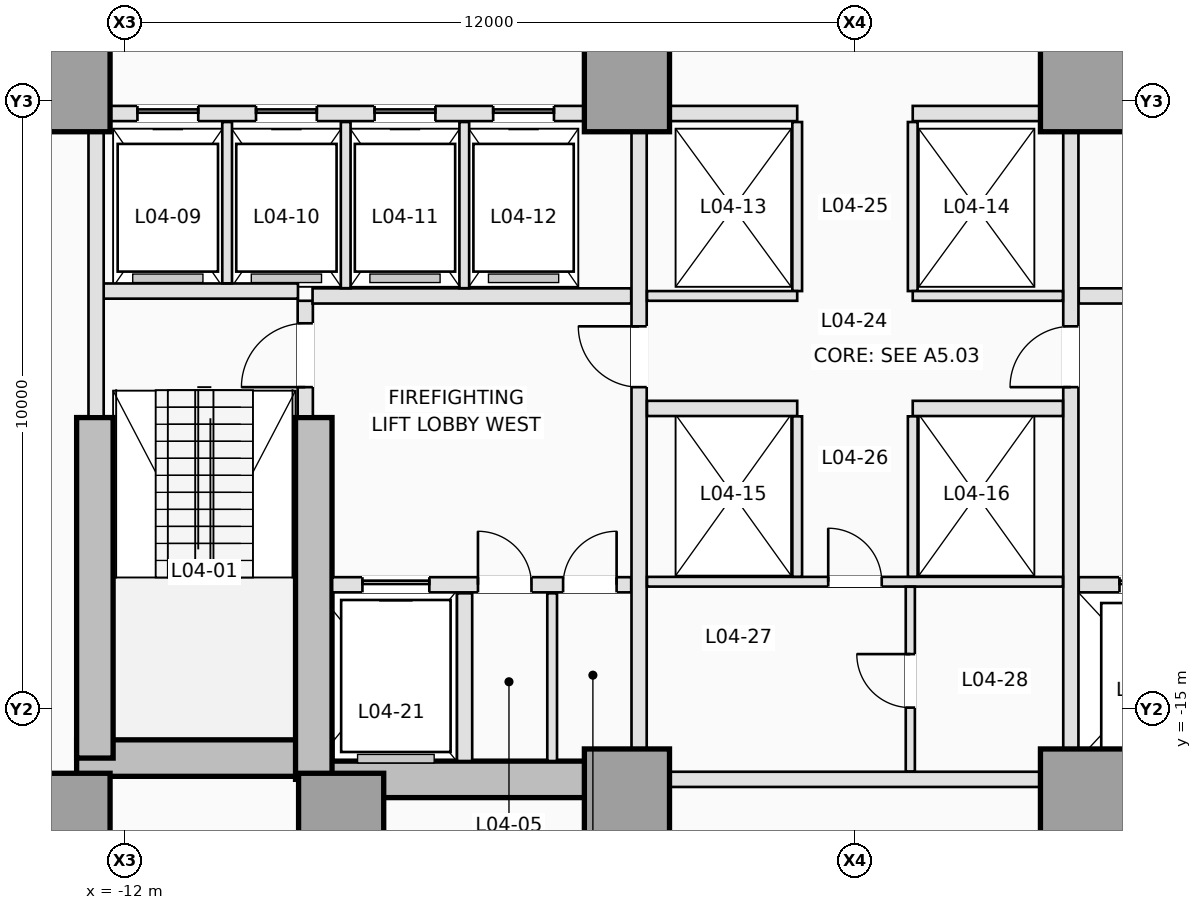
"""IFC4 building model, lengths in metres.
Left out: names, types, materials, properties, quantities, classifications, styles, units other than length and angle.
Written with IfcOpenShell. Run it as: python <this file> out.ifc"""

import sys

from ifc_helpers import new_model, si_unit, direction, frame, frame_2d, origin, origin_2d, place, context, subcontext, project, spatial, rectangle, extrude, element, fill, save


model = new_model("IFC4")
c1 = context("Model", 3, precision=1e-05, world=origin(), true_north=direction((0.0, 1.0)))
c2 = subcontext(c1, "Body", "Model", "MODEL_VIEW")
j1 = project(units=[si_unit("LENGTHUNIT", "METRE"), si_unit("PLANEANGLEUNIT", "RADIAN")], contexts=[c1])
p1 = place(None, origin())
s1 = spatial("IfcSite", under=j1, at=p1, CompositionType="ELEMENT")
p2 = place(p1, origin())
s2 = spatial("IfcBuilding", under=s1, at=p2, CompositionType="ELEMENT")
p3 = place(p2, frame((0.0, 0.0, 18.5)))
s3 = spatial("IfcBuildingStorey", under=s2, at=p3, CompositionType="ELEMENT", Elevation=18.5)
p4 = place(p3, frame((-12.8, -15.8, 0.0), z_axis=(0.0, 0.0, 1.0), x_axis=(1.0, 0.0, 0.0)))
e1 = element("IfcWall", 1, at=p4, inside=s3, PredefinedType="SHEAR", context=c2, shape_type="SweptSolid", body=[
    extrude(rectangle(XDim=4.2, YDim=0.6, at=frame_2d((2.1, 0.0))), origin(), (0.0, 0.0, 1.0), 4.5),
])
for number, where, z_axis, x_axis in (
    (2, (-8.9, -16.15, 0.0), (0.0, 0.0, 1.0), (1.0, 0.0, 0.0)),
    (3, (3.75, -16.15, 0.0), (0.0, 0.0, 1.0), (1.0, 0.0, 0.0)),
):
    element("IfcWall", number, at=place(p3, frame(where, z_axis=z_axis, x_axis=x_axis)), inside=s3, PredefinedType="SHEAR", context=c2, shape_type="SweptSolid", body=[
        extrude(rectangle(XDim=5.15, YDim=0.6, at=frame_2d((2.575, 0.0))), origin(), (0.0, 0.0, 1.0), 4.5),
    ])
p5 = place(p3, frame((-12.5, -15.8, 0.0), z_axis=(0.0, 0.0, 1.0), x_axis=(0.0, 1.0, 0.0)))
e4 = element("IfcWall", 4, at=p5, inside=s3, PredefinedType="SHEAR", context=c2, shape_type="SweptSolid", body=[
    extrude(rectangle(XDim=5.6, YDim=0.6, at=frame_2d((2.8, 0.0))), origin(), (0.0, 0.0, 1.0), 4.5),
])
p6 = place(p3, frame((-8.9, -16.15, 0.0), z_axis=(0.0, 0.0, 1.0), x_axis=(0.0, 1.0, 0.0)))
e5 = element("IfcWall", 5, at=p6, inside=s3, PredefinedType="SHEAR", context=c2, shape_type="SweptSolid", body=[
    extrude(rectangle(XDim=5.95, YDim=0.6, at=frame_2d((2.975, 0.0))), origin(), (0.0, 0.0, 1.0), 4.5),
])
for number, where, z_axis, x_axis in (
    (6, (-12.95, -16.75, 0.0), (0.0, 0.0, 1.0), (1.0, 0.0, 0.0)),
    (7, (-8.45, -16.75, 0.0), (0.0, 0.0, 1.0), (1.0, 0.0, 0.0)),
    (8, (-3.75, -16.35, 0.0), (0.0, 0.0, 1.0), (1.0, 0.0, 0.0)),
    (9, (3.75, -16.35, 0.0), (0.0, 0.0, 1.0), (1.0, 0.0, 0.0)),
    (10, (-12.95, -4.8, 0.0), (0.0, 0.0, 1.0), (1.0, 0.0, 0.0)),
    (11, (-3.75, -4.8, 0.0), (0.0, 0.0, 1.0), (1.0, 0.0, 0.0)),
    (12, (3.75, -4.8, 0.0), (0.0, 0.0, 1.0), (1.0, 0.0, 0.0)),
):
    element("IfcColumn", number, at=place(p3, frame(where, z_axis=z_axis, x_axis=x_axis)), inside=s3, PredefinedType="COLUMN", context=c2, shape_type="SweptSolid", body=[
        extrude(rectangle(XDim=1.4, YDim=1.4, at=origin_2d()), origin(), (0.0, 0.0, 1.0), 4.5),
    ])
p7 = place(p3, frame((-9.04, -10.18, 0.0), z_axis=(0.0, 0.0, 1.0), x_axis=(0.0, 1.0, 0.0)))
e13 = element("IfcWall", 13, at=p7, inside=s3, PredefinedType="PARTITIONING", context=c2, shape_type="SweptSolid", body=[
    extrude(rectangle(XDim=1.9, YDim=0.25, at=frame_2d((0.95, 0.0))), origin(), (0.0, 0.0, 1.0), 4.08),
])
p8 = place(p7, frame((0.48, 0.0, 0.0)))
e14 = element("IfcOpeningElement", 14, at=p8, cuts=e13, PredefinedType="OPENING", context=c2, shape_type="SweptSolid", body=[
    extrude(rectangle(XDim=1.05, YDim=2.15, at=frame_2d((0.525, 1.075))), frame((0.0, 0.135, 0.0), z_axis=(0.0, -1.0, 0.0), x_axis=(1.0, 0.0, 0.0)), (0.0, 0.0, 1.0), 0.27),
])
p9 = place(p3, frame((-12.38, -8.12, 0.0), z_axis=(0.0, 0.0, 1.0), x_axis=(1.0, 0.0, 0.0)))
e15 = element("IfcWall", 15, at=p9, inside=s3, PredefinedType="PARTITIONING", context=c2, shape_type="SweptSolid", body=[
    extrude(rectangle(XDim=3.22, YDim=0.25, at=frame_2d((1.61, 0.0))), origin(), (0.0, 0.0, 1.0), 4.08),
])
p10 = place(p3, frame((-12.48, -10.18, 0.0), z_axis=(0.0, 0.0, 1.0), x_axis=(0.0, 1.0, 0.0)))
e16 = element("IfcWall", 16, at=p10, inside=s3, PredefinedType="PARTITIONING", context=c2, shape_type="SweptSolid", body=[
    extrude(rectangle(XDim=4.678, YDim=0.25, at=frame_2d((2.339, 0.0))), origin(), (0.0, 0.0, 1.0), 4.08),
])
p11 = place(p3, frame((-8.598, -12.95, 0.0), z_axis=(0.0, 0.0, 1.0), x_axis=(1.0, 0.0, 0.0)))
e17 = element("IfcWall", 17, at=p11, inside=s3, PredefinedType="PARTITIONING", context=c2, shape_type="SweptSolid", body=[
    extrude(rectangle(XDim=4.918, YDim=0.25, at=frame_2d((2.459, 0.0))), origin(), (0.0, 0.0, 1.0), 4.08),
])
p12 = place(p11, frame((0.498, 0.0, 0.0)))
e18 = element("IfcOpeningElement", 18, at=p12, cuts=e17, PredefinedType="OPENING", context=c2, shape_type="SweptSolid", body=[
    extrude(rectangle(XDim=1.1, YDim=2.15, at=frame_2d((0.55, 1.075))), frame((0.0, 0.135, 0.0), z_axis=(0.0, -1.0, 0.0), x_axis=(1.0, 0.0, 0.0)), (0.0, 0.0, 1.0), 0.27),
])
p13 = place(p11, frame((2.398, 0.0, 0.0)))
e19 = element("IfcOpeningElement", 19, at=p13, cuts=e17, PredefinedType="OPENING", context=c2, shape_type="SweptSolid", body=[
    extrude(rectangle(XDim=0.88, YDim=2.1, at=frame_2d((0.44, 1.05))), frame((0.0, 0.135, 0.0), z_axis=(0.0, -1.0, 0.0), x_axis=(1.0, 0.0, 0.0)), (0.0, 0.0, 1.0), 0.27),
])
p14 = place(p11, frame((3.798, 0.0, 0.0)))
e20 = element("IfcOpeningElement", 20, at=p14, cuts=e17, PredefinedType="OPENING", context=c2, shape_type="SweptSolid", body=[
    extrude(rectangle(XDim=0.88, YDim=2.1, at=frame_2d((0.44, 1.05))), frame((0.0, 0.135, 0.0), z_axis=(0.0, -1.0, 0.0), x_axis=(1.0, 0.0, 0.0)), (0.0, 0.0, 1.0), 0.27),
])
p15 = place(p3, frame((3.68, -12.95, 0.0), z_axis=(0.0, 0.0, 1.0), x_axis=(1.0, 0.0, 0.0)))
e21 = element("IfcWall", 21, at=p15, inside=s3, PredefinedType="PARTITIONING", context=c2, shape_type="SweptSolid", body=[
    extrude(rectangle(XDim=4.918, YDim=0.25, at=frame_2d((2.459, 0.0))), origin(), (0.0, 0.0, 1.0), 4.08),
])
p16 = place(p15, frame((3.32, 0.0, 0.0)))
e22 = element("IfcOpeningElement", 22, at=p16, cuts=e21, PredefinedType="OPENING", context=c2, shape_type="SweptSolid", body=[
    extrude(rectangle(XDim=1.1, YDim=2.15, at=frame_2d((0.55, 1.075))), frame((0.0, 0.135, 0.0), z_axis=(0.0, -1.0, 0.0), x_axis=(1.0, 0.0, 0.0)), (0.0, 0.0, 1.0), 0.27),
])
p17 = place(p15, frame((0.67, 0.0, 0.0)))
e23 = element("IfcOpeningElement", 23, at=p17, cuts=e21, PredefinedType="OPENING", context=c2, shape_type="SweptSolid", body=[
    extrude(rectangle(XDim=1.2, YDim=2.15, at=frame_2d((0.6, 1.075))), frame((0.0, 0.135, 0.0), z_axis=(0.0, -1.0, 0.0), x_axis=(1.0, 0.0, 0.0)), (0.0, 0.0, 1.0), 0.27),
])
p18 = place(p3, frame((-6.42, -15.848, 0.0), z_axis=(0.0, 0.0, 1.0), x_axis=(0.0, 1.0, 0.0)))
e24 = element("IfcWall", 24, at=p18, inside=s3, PredefinedType="PARTITIONING", context=c2, shape_type="SweptSolid", body=[
    extrude(rectangle(XDim=2.758, YDim=0.25, at=frame_2d((1.379, 0.0))), origin(), (0.0, 0.0, 1.0), 4.08),
])
p19 = place(p3, frame((-4.98, -15.848, 0.0), z_axis=(0.0, 0.0, 1.0), x_axis=(0.0, 1.0, 0.0)))
e25 = element("IfcWall", 25, at=p19, inside=s3, PredefinedType="PARTITIONING", context=c2, shape_type="SweptSolid", body=[
    extrude(rectangle(XDim=2.758, YDim=0.16, at=frame_2d((1.379, 0.0))), origin(), (0.0, 0.0, 1.0), 4.08),
])
for number, where, z_axis, x_axis in (
    (26, (-8.92, -8.2, 0.0), (0.0, 0.0, 1.0), (1.0, 0.0, 0.0)),
    (27, (3.68, -8.2, 0.0), (0.0, 0.0, 1.0), (1.0, 0.0, 0.0)),
):
    element("IfcWall", number, at=place(p3, frame(where, z_axis=z_axis, x_axis=x_axis)), inside=s3, PredefinedType="PARTITIONING", context=c2, shape_type="SweptSolid", body=[
        extrude(rectangle(XDim=5.24, YDim=0.25, at=frame_2d((2.62, 0.0))), origin(), (0.0, 0.0, 1.0), 4.08),
    ])
p20 = place(p3, frame((-3.55, -15.648, 0.0), z_axis=(0.0, 0.0, 1.0), x_axis=(0.0, 1.0, 0.0)))
e28 = element("IfcWall", 28, at=p20, inside=s3, PredefinedType="PARTITIONING", context=c2, shape_type="SweptSolid", body=[
    extrude(rectangle(XDim=10.146, YDim=0.25, at=frame_2d((5.073, 0.0))), origin(), (0.0, 0.0, 1.0), 4.08),
])
p21 = place(p20, frame((5.948, 0.0, 0.0)))
e29 = element("IfcOpeningElement", 29, at=p21, cuts=e28, PredefinedType="OPENING", context=c2, shape_type="SweptSolid", body=[
    extrude(rectangle(XDim=1.0, YDim=2.15, at=frame_2d((0.5, 1.075))), frame((0.0, 0.135, 0.0), z_axis=(0.0, -1.0, 0.0), x_axis=(1.0, 0.0, 0.0)), (0.0, 0.0, 1.0), 0.27),
])
p22 = place(p3, frame((3.55, -15.648, 0.0), z_axis=(0.0, 0.0, 1.0), x_axis=(0.0, 1.0, 0.0)))
e30 = element("IfcWall", 30, at=p22, inside=s3, PredefinedType="PARTITIONING", context=c2, shape_type="SweptSolid", body=[
    extrude(rectangle(XDim=10.146, YDim=0.25, at=frame_2d((5.073, 0.0))), origin(), (0.0, 0.0, 1.0), 4.08),
])
p23 = place(p22, frame((5.948, 0.0, 0.0)))
e31 = element("IfcOpeningElement", 31, at=p23, cuts=e30, PredefinedType="OPENING", context=c2, shape_type="SweptSolid", body=[
    extrude(rectangle(XDim=1.0, YDim=2.15, at=frame_2d((0.5, 1.075))), frame((0.0, 0.135, 0.0), z_axis=(0.0, -1.0, 0.0), x_axis=(1.0, 0.0, 0.0)), (0.0, 0.0, 1.0), 0.27),
])
p24 = place(p3, frame((-12.248, -5.2, 0.0), z_axis=(0.0, 0.0, 1.0), x_axis=(1.0, 0.0, 0.0)))
e32 = element("IfcWall", 32, at=p24, inside=s3, PredefinedType="PARTITIONING", context=c2, shape_type="SweptSolid", body=[
    extrude(rectangle(XDim=7.796, YDim=0.25, at=frame_2d((3.898, 0.0))), origin(), (0.0, 0.0, 1.0), 4.08),
])
p25 = place(p24, frame((0.448, 0.0, 0.0)))
e33 = element("IfcOpeningElement", 33, at=p25, cuts=e32, PredefinedType="OPENING", context=c2, shape_type="SweptSolid", body=[
    extrude(rectangle(XDim=1.0, YDim=2.15, at=frame_2d((0.5, 1.075))), frame((0.0, 0.135, 0.0), z_axis=(0.0, -1.0, 0.0), x_axis=(1.0, 0.0, 0.0)), (0.0, 0.0, 1.0), 0.27),
])
p26 = place(p24, frame((2.398, 0.0, 0.0)))
e34 = element("IfcOpeningElement", 34, at=p26, cuts=e32, PredefinedType="OPENING", context=c2, shape_type="SweptSolid", body=[
    extrude(rectangle(XDim=1.0, YDim=2.15, at=frame_2d((0.5, 1.075))), frame((0.0, 0.135, 0.0), z_axis=(0.0, -1.0, 0.0), x_axis=(1.0, 0.0, 0.0)), (0.0, 0.0, 1.0), 0.27),
])
p27 = place(p24, frame((4.348, 0.0, 0.0)))
e35 = element("IfcOpeningElement", 35, at=p27, cuts=e32, PredefinedType="OPENING", context=c2, shape_type="SweptSolid", body=[
    extrude(rectangle(XDim=1.0, YDim=2.15, at=frame_2d((0.5, 1.075))), frame((0.0, 0.135, 0.0), z_axis=(0.0, -1.0, 0.0), x_axis=(1.0, 0.0, 0.0)), (0.0, 0.0, 1.0), 0.27),
])
p28 = place(p24, frame((6.298, 0.0, 0.0)))
e36 = element("IfcOpeningElement", 36, at=p28, cuts=e32, PredefinedType="OPENING", context=c2, shape_type="SweptSolid", body=[
    extrude(rectangle(XDim=1.0, YDim=2.15, at=frame_2d((0.5, 1.075))), frame((0.0, 0.135, 0.0), z_axis=(0.0, -1.0, 0.0), x_axis=(1.0, 0.0, 0.0)), (0.0, 0.0, 1.0), 0.27),
])
for number, where, z_axis, x_axis in (
    (37, (-3.048, -5.2, 0.0), (0.0, 0.0, 1.0), (1.0, 0.0, 0.0)),
    (38, (0.95, -5.2, 0.0), (0.0, 0.0, 1.0), (1.0, 0.0, 0.0)),
):
    element("IfcWall", number, at=place(p3, frame(where, z_axis=z_axis, x_axis=x_axis)), inside=s3, PredefinedType="PARTITIONING", context=c2, shape_type="SweptSolid", body=[
        extrude(rectangle(XDim=2.098, YDim=0.25, at=frame_2d((1.049, 0.0))), origin(), (0.0, 0.0, 1.0), 4.08),
    ])
p29 = place(p3, frame((-10.325, -7.993, 0.0), z_axis=(0.0, 0.0, 1.0), x_axis=(0.0, 1.0, 0.0)))
e39 = element("IfcWall", 39, at=p29, inside=s3, PredefinedType="PARTITIONING", context=c2, shape_type="SweptSolid", body=[
    extrude(rectangle(XDim=2.653, YDim=0.16, at=frame_2d((1.326, 0.0))), origin(), (0.0, 0.0, 1.0), 4.08),
])
for number, where, z_axis, x_axis in (
    (40, (-8.375, -8.073, 0.0), (0.0, 0.0, 1.0), (0.0, 1.0, 0.0)),
    (41, (-6.425, -8.073, 0.0), (0.0, 0.0, 1.0), (0.0, 1.0, 0.0)),
):
    element("IfcWall", number, at=place(p3, frame(where, z_axis=z_axis, x_axis=x_axis)), inside=s3, PredefinedType="PARTITIONING", context=c2, shape_type="SweptSolid", body=[
        extrude(rectangle(XDim=2.733, YDim=0.16, at=frame_2d((1.366, 0.0))), origin(), (0.0, 0.0, 1.0), 4.08),
    ])
p30 = place(p3, frame((-3.048, -16.15, 0.0), z_axis=(0.0, 0.0, 1.0), x_axis=(1.0, 0.0, 0.0)))
e42 = element("IfcWall", 42, at=p30, inside=s3, PredefinedType="PARTITIONING", context=c2, shape_type="SweptSolid", body=[
    extrude(rectangle(XDim=6.096, YDim=0.25, at=frame_2d((3.048, 0.0))), origin(), (0.0, 0.0, 1.0), 3.056),
])
for number, where, z_axis, x_axis in (
    (43, (-0.95, -8.12, 0.0), (0.0, 0.0, 1.0), (0.0, 1.0, 0.0)),
    (44, (0.95, -8.12, 0.0), (0.0, 0.0, 1.0), (0.0, 1.0, 0.0)),
):
    element("IfcWall", number, at=place(p3, frame(where, z_axis=z_axis, x_axis=x_axis)), inside=s3, PredefinedType="PARTITIONING", context=c2, shape_type="SweptSolid", body=[
        extrude(rectangle(XDim=2.78, YDim=0.16, at=frame_2d((1.39, 0.0))), origin(), (0.0, 0.0, 1.0), 4.08),
    ])
for number, where, z_axis, x_axis in (
    (45, (-3.42, -8.2, 0.0), (0.0, 0.0, 1.0), (1.0, 0.0, 0.0)),
    (46, (0.95, -8.2, 0.0), (0.0, 0.0, 1.0), (1.0, 0.0, 0.0)),
):
    element("IfcWall", number, at=place(p3, frame(where, z_axis=z_axis, x_axis=x_axis)), inside=s3, PredefinedType="PARTITIONING", context=c2, shape_type="SweptSolid", body=[
        extrude(rectangle(XDim=2.47, YDim=0.16, at=frame_2d((1.235, 0.0))), origin(), (0.0, 0.0, 1.0), 4.08),
    ])
for number, where, z_axis, x_axis in (
    (47, (-3.42, -10.05, 0.0), (0.0, 0.0, 1.0), (1.0, 0.0, 0.0)),
    (48, (0.95, -10.05, 0.0), (0.0, 0.0, 1.0), (1.0, 0.0, 0.0)),
):
    element("IfcWall", number, at=place(p3, frame(where, z_axis=z_axis, x_axis=x_axis)), inside=s3, PredefinedType="PARTITIONING", context=c2, shape_type="SweptSolid", body=[
        extrude(rectangle(XDim=2.47, YDim=0.25, at=frame_2d((1.235, 0.0))), origin(), (0.0, 0.0, 1.0), 4.08),
    ])
p31 = place(p3, frame((-3.42, -12.9, 0.0), z_axis=(0.0, 0.0, 1.0), x_axis=(1.0, 0.0, 0.0)))
e49 = element("IfcWall", 49, at=p31, inside=s3, PredefinedType="PARTITIONING", context=c2, shape_type="SweptSolid", body=[
    extrude(rectangle(XDim=6.84, YDim=0.16, at=frame_2d((3.42, 0.0))), origin(), (0.0, 0.0, 1.0), 4.08),
])
p32 = place(p31, frame((2.98, 0.0, 0.0)))
e50 = element("IfcOpeningElement", 50, at=p32, cuts=e49, PredefinedType="OPENING", context=c2, shape_type="SweptSolid", body=[
    extrude(rectangle(XDim=0.88, YDim=2.12, at=frame_2d((0.44, 1.06))), frame((0.0, 0.09, 0.0), z_axis=(0.0, -1.0, 0.0), x_axis=(1.0, 0.0, 0.0)), (0.0, 0.0, 1.0), 0.18),
])
for number, where, z_axis, x_axis in (
    (51, (-0.95, -12.818, 0.0), (0.0, 0.0, 1.0), (0.0, 1.0, 0.0)),
    (52, (0.95, -12.818, 0.0), (0.0, 0.0, 1.0), (0.0, 1.0, 0.0)),
):
    element("IfcWall", number, at=place(p3, frame(where, z_axis=z_axis, x_axis=x_axis)), inside=s3, PredefinedType="PARTITIONING", context=c2, shape_type="SweptSolid", body=[
        extrude(rectangle(XDim=2.638, YDim=0.16, at=frame_2d((1.319, 0.0))), origin(), (0.0, 0.0, 1.0), 4.08),
    ])
p33 = place(p3, frame((0.91, -16.02, 0.0), z_axis=(0.0, 0.0, 1.0), x_axis=(0.0, 1.0, 0.0)))
e53 = element("IfcWall", 53, at=p33, inside=s3, PredefinedType="PARTITIONING", context=c2, shape_type="SweptSolid", body=[
    extrude(rectangle(XDim=3.038, YDim=0.15, at=frame_2d((1.519, 0.0))), origin(), (0.0, 0.0, 1.0), 4.08),
])
p34 = place(p33, frame((1.05, 0.0, 0.0)))
e54 = element("IfcOpeningElement", 54, at=p34, cuts=e53, PredefinedType="OPENING", context=c2, shape_type="SweptSolid", body=[
    extrude(rectangle(XDim=0.88, YDim=2.12, at=frame_2d((0.44, 1.06))), frame((0.0, 0.085, 0.0), z_axis=(0.0, -1.0, 0.0), x_axis=(1.0, 0.0, 0.0)), (0.0, 0.0, 1.0), 0.17),
])
p35 = place(p25, origin())
e55 = element("IfcDoor", 55, at=p35, inside=s3, OperationType="SLIDING_TO_LEFT", PredefinedType="DOOR", context=c2, shape_type="SweptSolid", body=[
    extrude(rectangle(XDim=1.0, YDim=2.15, at=frame_2d((0.5, 1.075))), frame((0.0, 0.025, 0.0), z_axis=(0.0, -1.0, 0.0), x_axis=(1.0, 0.0, 0.0)), (0.0, 0.0, 1.0), 0.05),
])
fill(e33, e55)
p36 = place(p26, origin())
e56 = element("IfcDoor", 56, at=p36, inside=s3, OperationType="SLIDING_TO_LEFT", PredefinedType="DOOR", context=c2, shape_type="SweptSolid", body=[
    extrude(rectangle(XDim=1.0, YDim=2.15, at=frame_2d((0.5, 1.075))), frame((0.0, 0.025, 0.0), z_axis=(0.0, -1.0, 0.0), x_axis=(1.0, 0.0, 0.0)), (0.0, 0.0, 1.0), 0.05),
])
fill(e34, e56)
p37 = place(p27, origin())
e57 = element("IfcDoor", 57, at=p37, inside=s3, OperationType="SLIDING_TO_LEFT", PredefinedType="DOOR", context=c2, shape_type="SweptSolid", body=[
    extrude(rectangle(XDim=1.0, YDim=2.15, at=frame_2d((0.5, 1.075))), frame((0.0, 0.025, 0.0), z_axis=(0.0, -1.0, 0.0), x_axis=(1.0, 0.0, 0.0)), (0.0, 0.0, 1.0), 0.05),
])
fill(e35, e57)
p38 = place(p28, origin())
e58 = element("IfcDoor", 58, at=p38, inside=s3, OperationType="SLIDING_TO_LEFT", PredefinedType="DOOR", context=c2, shape_type="SweptSolid", body=[
    extrude(rectangle(XDim=1.0, YDim=2.15, at=frame_2d((0.5, 1.075))), frame((0.0, 0.025, 0.0), z_axis=(0.0, -1.0, 0.0), x_axis=(1.0, 0.0, 0.0)), (0.0, 0.0, 1.0), 0.05),
])
fill(e36, e58)
p39 = place(p12, origin())
e59 = element("IfcDoor", 59, at=p39, inside=s3, OperationType="SLIDING_TO_LEFT", PredefinedType="DOOR", context=c2, shape_type="SweptSolid", body=[
    extrude(rectangle(XDim=1.1, YDim=2.15, at=frame_2d((0.55, 1.075))), frame((0.0, 0.025, 0.0), z_axis=(0.0, -1.0, 0.0), x_axis=(1.0, 0.0, 0.0)), (0.0, 0.0, 1.0), 0.05),
])
fill(e18, e59)
p40 = place(p17, origin())
e60 = element("IfcDoor", 60, at=p40, inside=s3, OperationType="SLIDING_TO_LEFT", PredefinedType="DOOR", context=c2, shape_type="SweptSolid", body=[
    extrude(rectangle(XDim=1.2, YDim=2.15, at=frame_2d((0.6, 1.075))), frame((0.0, 0.025, 0.0), z_axis=(0.0, -1.0, 0.0), x_axis=(1.0, 0.0, 0.0)), (0.0, 0.0, 1.0), 0.05),
])
fill(e23, e60)
p41 = place(p8, origin())
e61 = element("IfcDoor", 61, at=p41, inside=s3, OperationType="SINGLE_SWING_LEFT", PredefinedType="DOOR", context=c2, shape_type="SweptSolid", body=[
    extrude(rectangle(XDim=1.05, YDim=2.15, at=frame_2d((0.525, 1.075))), frame((0.0, 0.025, 0.0), z_axis=(0.0, -1.0, 0.0), x_axis=(1.0, 0.0, 0.0)), (0.0, 0.0, 1.0), 0.05),
])
fill(e14, e61)
p42 = place(p13, origin())
e62 = element("IfcDoor", 62, at=p42, inside=s3, OperationType="SINGLE_SWING_LEFT", PredefinedType="TRAPDOOR", context=c2, shape_type="SweptSolid", body=[
    extrude(rectangle(XDim=0.88, YDim=2.1, at=frame_2d((0.44, 1.05))), frame((0.0, 0.025, 0.0), z_axis=(0.0, -1.0, 0.0), x_axis=(1.0, 0.0, 0.0)), (0.0, 0.0, 1.0), 0.05),
])
fill(e19, e62)
p43 = place(p14, origin())
e63 = element("IfcDoor", 63, at=p43, inside=s3, OperationType="SINGLE_SWING_RIGHT", PredefinedType="TRAPDOOR", context=c2, shape_type="SweptSolid", body=[
    extrude(rectangle(XDim=0.88, YDim=2.1, at=frame_2d((0.44, 1.05))), frame((0.0, 0.025, 0.0), z_axis=(0.0, -1.0, 0.0), x_axis=(1.0, 0.0, 0.0)), (0.0, 0.0, 1.0), 0.05),
])
fill(e20, e63)
p44 = place(p21, origin())
e64 = element("IfcDoor", 64, at=p44, inside=s3, OperationType="SINGLE_SWING_RIGHT", PredefinedType="DOOR", context=c2, shape_type="SweptSolid", body=[
    extrude(rectangle(XDim=1.0, YDim=2.15, at=frame_2d((0.5, 1.075))), frame((0.0, 0.025, 0.0), z_axis=(0.0, -1.0, 0.0), x_axis=(1.0, 0.0, 0.0)), (0.0, 0.0, 1.0), 0.05),
])
fill(e29, e64)
p45 = place(p23, origin())
e65 = element("IfcDoor", 65, at=p45, inside=s3, OperationType="SINGLE_SWING_LEFT", PredefinedType="DOOR", context=c2, shape_type="SweptSolid", body=[
    extrude(rectangle(XDim=1.0, YDim=2.15, at=frame_2d((0.5, 1.075))), frame((0.0, 0.025, 0.0), z_axis=(0.0, -1.0, 0.0), x_axis=(1.0, 0.0, 0.0)), (0.0, 0.0, 1.0), 0.05),
])
fill(e31, e65)
p46 = place(p32, origin())
e66 = element("IfcDoor", 66, at=p46, inside=s3, OperationType="SINGLE_SWING_LEFT", PredefinedType="DOOR", context=c2, shape_type="SweptSolid", body=[
    extrude(rectangle(XDim=0.88, YDim=2.12, at=frame_2d((0.44, 1.06))), frame((0.0, 0.025, 0.0), z_axis=(0.0, -1.0, 0.0), x_axis=(1.0, 0.0, 0.0)), (0.0, 0.0, 1.0), 0.05),
])
fill(e50, e66)
p47 = place(p34, origin())
e67 = element("IfcDoor", 67, at=p47, inside=s3, OperationType="SINGLE_SWING_RIGHT", PredefinedType="DOOR", context=c2, shape_type="SweptSolid", body=[
    extrude(rectangle(XDim=0.88, YDim=2.12, at=frame_2d((0.44, 1.06))), frame((0.0, 0.025, 0.0), z_axis=(0.0, -1.0, 0.0), x_axis=(1.0, 0.0, 0.0)), (0.0, 0.0, 1.0), 0.05),
])
fill(e54, e67)
save(model, sys.argv[1])
